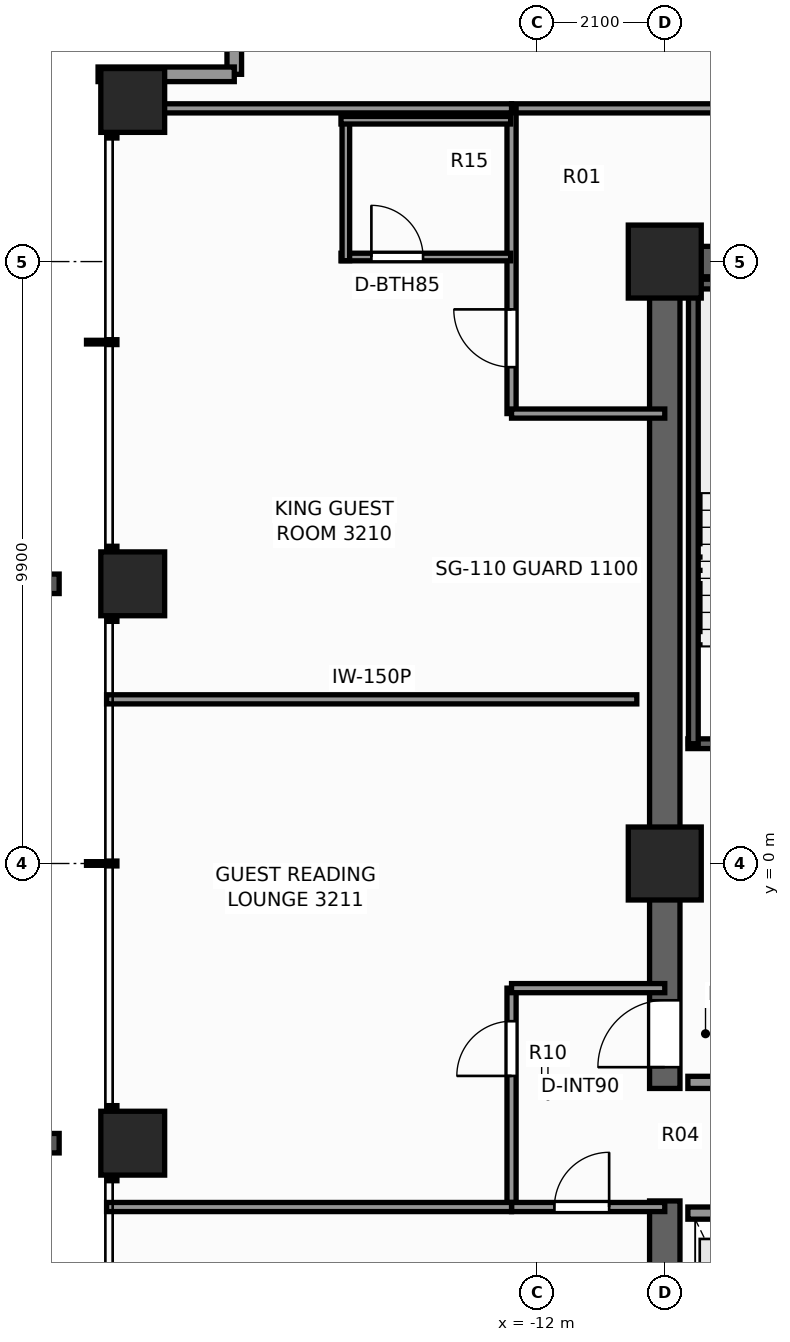
"""IFC4 building model, lengths in metres.
Left out: names, types, materials, properties, quantities, classifications, styles, units other than length and angle.
Written with IfcOpenShell. Run it as: python <this file> out.ifc"""

import sys

from ifc_helpers import new_model, si_unit, direction, frame, frame_2d, origin, origin_2d, place, context, subcontext, project, spatial, rectangle, extrude, element, fill, save


model = new_model("IFC4")
c1 = context("Model", 3, precision=1e-05, world=origin(), true_north=direction((0.0, 1.0)))
c2 = subcontext(c1, "Body", "Model", "MODEL_VIEW")
j1 = project(units=[si_unit("LENGTHUNIT", "METRE"), si_unit("PLANEANGLEUNIT", "RADIAN")], contexts=[c1])
p1 = place(None, origin())
s1 = spatial("IfcSite", under=j1, at=p1, CompositionType="ELEMENT")
p2 = place(p1, origin())
s2 = spatial("IfcBuilding", under=s1, at=p2, CompositionType="ELEMENT")
p3 = place(p2, frame((0.0, 0.0, 111.8)))
s3 = spatial("IfcBuildingStorey", under=s2, at=p3, CompositionType="ELEMENT", Elevation=111.8)
p4 = place(p3, frame((-10.15, 9.9, 0.0), z_axis=(0.0, 0.0, 1.0), x_axis=(1.0, 0.0, 0.0)))
e1 = element("IfcWall", 1, at=p4, inside=s3, PredefinedType="SHEAR", context=c2, shape_type="SweptSolid", body=[
    extrude(rectangle(XDim=14.57, YDim=0.5, at=frame_2d((7.285, 0.0))), origin(), (0.0, 0.0, 1.0), 3.3),
])
p5 = place(p3, frame((-9.9, -9.65, 0.0), z_axis=(0.0, 0.0, 1.0), x_axis=(0.0, 1.0, 0.0)))
e2 = element("IfcWall", 2, at=p5, inside=s3, PredefinedType="SHEAR", context=c2, shape_type="SweptSolid", body=[
    extrude(rectangle(XDim=4.1, YDim=0.5, at=frame_2d((2.05, 0.0))), origin(), (0.0, 0.0, 1.0), 3.3),
])
p6 = place(p3, frame((-9.9, -3.7, 0.0), z_axis=(0.0, 0.0, 1.0), x_axis=(0.0, 1.0, 0.0)))
e3 = element("IfcWall", 3, at=p6, inside=s3, PredefinedType="SHEAR", context=c2, shape_type="SweptSolid", body=[
    extrude(rectangle(XDim=13.35, YDim=0.5, at=frame_2d((6.675, 0.0))), origin(), (0.0, 0.0, 1.0), 3.3),
])
p7 = place(p6, frame((0.35, 0.0, 0.0)))
e4 = element("IfcOpeningElement", 4, at=p7, cuts=e3, PredefinedType="OPENING", context=c2, shape_type="SweptSolid", body=[
    extrude(rectangle(XDim=1.1, YDim=2.2, at=frame_2d((0.55, 1.1))), frame((0.0, 0.26, 0.0), z_axis=(0.0, -1.0, 0.0), x_axis=(1.0, 0.0, 0.0)), (0.0, 0.0, 1.0), 0.52),
])
for number, where, z_axis, x_axis in (
    (5, (-9.9, 9.9, 0.0), (0.0, 0.0, 1.0), (1.0, 0.0, 0.0)),
    (6, (-9.9, 0.0, 0.0), (0.0, 0.0, 1.0), (1.0, 0.0, 0.0)),
):
    element("IfcColumn", number, at=place(p3, frame(where, z_axis=z_axis, x_axis=x_axis)), inside=s3, PredefinedType="COLUMN", context=c2, shape_type="SweptSolid", body=[
        extrude(rectangle(XDim=1.2, YDim=1.2, at=origin_2d()), origin(), (0.0, 0.0, 1.0), 3.3),
    ])
for number, where, z_axis, x_axis in (
    (7, (-18.65, -4.6, 0.0), (0.0, 0.0, 1.0), (1.0, 0.0, 0.0)),
    (8, (-18.65, 4.6, 0.0), (0.0, 0.0, 1.0), (1.0, 0.0, 0.0)),
    (9, (-18.65, 12.55, 0.0), (0.0, 0.0, 1.0), (1.0, 0.0, 0.0)),
):
    element("IfcColumn", number, at=place(p3, frame(where, z_axis=z_axis, x_axis=x_axis)), inside=s3, PredefinedType="COLUMN", context=c2, shape_type="SweptSolid", body=[
        extrude(rectangle(XDim=1.05, YDim=1.05, at=origin_2d()), origin(), (0.0, 0.0, 1.0), 3.3),
    ])
p8 = place(p3, frame((-16.98, 12.98, 0.0), z_axis=(0.0, 0.0, 1.0), x_axis=(0.0, 1.0, 0.0)))
e10 = element("IfcWall", 10, at=p8, inside=s3, PredefinedType="STANDARD", context=c2, shape_type="SweptSolid", body=[
    extrude(rectangle(XDim=2.24, YDim=0.24, at=frame_2d((1.12, 0.0))), origin(), (0.0, 0.0, 1.0), 2.459),
])
p9 = place(p8, frame((0.45, 0.0, 0.65)))
e11 = element("IfcOpeningElement", 11, at=p9, cuts=e10, PredefinedType="OPENING", context=c2, shape_type="SweptSolid", body=[
    extrude(rectangle(XDim=1.1, YDim=1.45, at=frame_2d((0.55, 0.725))), frame((0.0, 0.13, 0.0), z_axis=(0.0, -1.0, 0.0), x_axis=(1.0, 0.0, 0.0)), (0.0, 0.0, 1.0), 0.26),
])
p10 = place(p3, frame((-19.22, 12.98, 0.0), z_axis=(0.0, 0.0, 1.0), x_axis=(1.0, 0.0, 0.0)))
e12 = element("IfcWall", 12, at=p10, inside=s3, PredefinedType="STANDARD", context=c2, shape_type="SweptSolid", body=[
    extrude(rectangle(XDim=2.24, YDim=0.24, at=frame_2d((1.12, 0.0))), origin(), (0.0, 0.0, 1.0), 2.459),
])
p11 = place(p3, frame((-9.52, 1.97, 0.0), z_axis=(0.0, 0.0, 1.0), x_axis=(1.0, 0.0, 0.0)))
e13 = element("IfcWall", 13, at=p11, inside=s3, PredefinedType="SHEAR", context=c2, shape_type="SweptSolid", body=[
    extrude(rectangle(XDim=3.52, YDim=0.16, at=frame_2d((1.76, 0.0))), origin(), (0.0, 0.0, 1.0), 3.3),
])
p12 = place(p11, frame((1.15, 0.0, 0.0)))
e14 = element("IfcOpeningElement", 14, at=p12, cuts=e13, PredefinedType="OPENING", context=c2, shape_type="SweptSolid", body=[
    extrude(rectangle(XDim=1.1, YDim=2.2, at=frame_2d((0.55, 1.1))), frame((0.0, 0.09, 0.0), z_axis=(0.0, -1.0, 0.0), x_axis=(1.0, 0.0, 0.0)), (0.0, 0.0, 1.0), 0.18),
])
p13 = place(p3, frame((-9.52, 9.53, 0.0), z_axis=(0.0, 0.0, 1.0), x_axis=(1.0, 0.0, 0.0)))
e15 = element("IfcWall", 15, at=p13, inside=s3, PredefinedType="SHEAR", context=c2, shape_type="SweptSolid", body=[
    extrude(rectangle(XDim=3.52, YDim=0.16, at=frame_2d((1.76, 0.0))), origin(), (0.0, 0.0, 1.0), 3.3),
])
p14 = place(p3, frame((-9.43, 1.97, 0.0), z_axis=(0.0, 0.0, 1.0), x_axis=(0.0, 1.0, 0.0)))
e16 = element("IfcWall", 16, at=p14, inside=s3, PredefinedType="SHEAR", context=c2, shape_type="SweptSolid", body=[
    extrude(rectangle(XDim=7.56, YDim=0.16, at=frame_2d((3.78, 0.0))), origin(), (0.0, 0.0, 1.0), 3.3),
])
p15 = place(p3, frame((-9.52, -3.6, 0.0), z_axis=(0.0, 0.0, 1.0), x_axis=(1.0, 0.0, 0.0)))
e17 = element("IfcWall", 17, at=p15, inside=s3, PredefinedType="SOLIDWALL", context=c2, shape_type="SweptSolid", body=[
    extrude(rectangle(XDim=3.77, YDim=0.2, at=frame_2d((1.885, 0.0))), origin(), (0.0, 0.0, 1.0), 3.08),
])
p16 = place(p15, frame((1.15, 0.0, 0.0)))
e18 = element("IfcOpeningElement", 18, at=p16, cuts=e17, PredefinedType="OPENING", context=c2, shape_type="SweptSolid", body=[
    extrude(rectangle(XDim=0.95, YDim=2.06, at=frame_2d((0.475, 1.03))), frame((0.0, 0.11, 0.0), z_axis=(0.0, -1.0, 0.0), x_axis=(1.0, 0.0, 0.0)), (0.0, 0.0, 1.0), 0.22),
])
p17 = place(p3, frame((-9.52, -5.75, 0.0), z_axis=(0.0, 0.0, 1.0), x_axis=(1.0, 0.0, 0.0)))
e19 = element("IfcWall", 19, at=p17, inside=s3, PredefinedType="SOLIDWALL", context=c2, shape_type="SweptSolid", body=[
    extrude(rectangle(XDim=5.66, YDim=0.2, at=frame_2d((2.83, 0.0))), origin(), (0.0, 0.0, 1.0), 3.08),
])
p18 = place(p17, frame((0.55, 0.0, 0.0)))
e20 = element("IfcOpeningElement", 20, at=p18, cuts=e19, PredefinedType="OPENING", context=c2, shape_type="SweptSolid", body=[
    extrude(rectangle(XDim=1.1, YDim=2.2, at=frame_2d((0.55, 1.1))), frame((0.0, 0.11, 0.0), z_axis=(0.0, -1.0, 0.0), x_axis=(1.0, 0.0, 0.0)), (0.0, 0.0, 1.0), 0.22),
])
p19 = place(p17, frame((2.48, 0.0, 0.0)))
e21 = element("IfcOpeningElement", 21, at=p19, cuts=e19, PredefinedType="OPENING", context=c2, shape_type="SweptSolid", body=[
    extrude(rectangle(XDim=1.1, YDim=2.2, at=frame_2d((0.55, 1.1))), frame((0.0, 0.11, 0.0), z_axis=(0.0, -1.0, 0.0), x_axis=(1.0, 0.0, 0.0)), (0.0, 0.0, 1.0), 0.22),
])
p20 = place(p17, frame((4.41, 0.0, 0.0)))
e22 = element("IfcOpeningElement", 22, at=p20, cuts=e19, PredefinedType="OPENING", context=c2, shape_type="SweptSolid", body=[
    extrude(rectangle(XDim=1.1, YDim=2.2, at=frame_2d((0.55, 1.1))), frame((0.0, 0.11, 0.0), z_axis=(0.0, -1.0, 0.0), x_axis=(1.0, 0.0, 0.0)), (0.0, 0.0, 1.0), 0.22),
])
p21 = place(p3, frame((-12.42, 12.42, 0.0), z_axis=(0.0, 0.0, 1.0), x_axis=(1.0, 0.0, 0.0)))
e23 = element("IfcWall", 23, at=p21, inside=s3, PredefinedType="PARTITIONING", context=c2, shape_type="SweptSolid", body=[
    extrude(rectangle(XDim=24.68, YDim=0.15, at=frame_2d((12.34, 0.0))), origin(), (0.0, 0.0, 1.0), 2.292),
])
p22 = place(p21, frame((3.781, 0.0, 0.0)))
e24 = element("IfcOpeningElement", 24, at=p22, cuts=e23, PredefinedType="OPENING", context=c2, shape_type="SweptSolid", body=[
    extrude(rectangle(XDim=0.9, YDim=2.06, at=frame_2d((0.45, 1.03))), frame((0.0, 0.085, 0.0), z_axis=(0.0, -1.0, 0.0), x_axis=(1.0, 0.0, 0.0)), (0.0, 0.0, 1.0), 0.17),
])
p23 = place(p21, frame((8.773, 0.0, 0.0)))
e25 = element("IfcOpeningElement", 25, at=p23, cuts=e23, PredefinedType="OPENING", context=c2, shape_type="SweptSolid", body=[
    extrude(rectangle(XDim=0.9, YDim=2.06, at=frame_2d((0.45, 1.03))), frame((0.0, 0.085, 0.0), z_axis=(0.0, -1.0, 0.0), x_axis=(1.0, 0.0, 0.0)), (0.0, 0.0, 1.0), 0.17),
])
p24 = place(p21, frame((10.656, 0.0, 0.0)))
e26 = element("IfcOpeningElement", 26, at=p24, cuts=e23, PredefinedType="OPENING", context=c2, shape_type="SweptSolid", body=[
    extrude(rectangle(XDim=0.9, YDim=2.06, at=frame_2d((0.45, 1.03))), frame((0.0, 0.085, 0.0), z_axis=(0.0, -1.0, 0.0), x_axis=(1.0, 0.0, 0.0)), (0.0, 0.0, 1.0), 0.17),
])
p25 = place(p21, frame((13.773, 0.0, 0.0)))
e27 = element("IfcOpeningElement", 27, at=p25, cuts=e23, PredefinedType="OPENING", context=c2, shape_type="SweptSolid", body=[
    extrude(rectangle(XDim=0.95, YDim=2.06, at=frame_2d((0.475, 1.03))), frame((0.0, 0.085, 0.0), z_axis=(0.0, -1.0, 0.0), x_axis=(1.0, 0.0, 0.0)), (0.0, 0.0, 1.0), 0.17),
])
p26 = place(p21, frame((18.0, 0.0, 0.0)))
e28 = element("IfcOpeningElement", 28, at=p26, cuts=e23, PredefinedType="OPENING", context=c2, shape_type="SweptSolid", body=[
    extrude(rectangle(XDim=0.9, YDim=2.06, at=frame_2d((0.45, 1.03))), frame((0.0, 0.085, 0.0), z_axis=(0.0, -1.0, 0.0), x_axis=(1.0, 0.0, 0.0)), (0.0, 0.0, 1.0), 0.17),
])
p27 = place(p21, frame((19.861, 0.0, 0.0)))
e29 = element("IfcOpeningElement", 29, at=p27, cuts=e23, PredefinedType="OPENING", context=c2, shape_type="SweptSolid", body=[
    extrude(rectangle(XDim=0.95, YDim=2.06, at=frame_2d((0.475, 1.03))), frame((0.0, 0.085, 0.0), z_axis=(0.0, -1.0, 0.0), x_axis=(1.0, 0.0, 0.0)), (0.0, 0.0, 1.0), 0.17),
])
p28 = place(p3, frame((-12.42, 7.4, 0.0), z_axis=(0.0, 0.0, 1.0), x_axis=(0.0, 1.0, 0.0)))
e30 = element("IfcWall", 30, at=p28, inside=s3, PredefinedType="PARTITIONING", context=c2, shape_type="SweptSolid", body=[
    extrude(rectangle(XDim=5.02, YDim=0.15, at=frame_2d((2.51, 0.0))), origin(), (0.0, 0.0, 1.0), 2.292),
])
p29 = place(p28, frame((0.764, 0.0, 0.0)))
e31 = element("IfcOpeningElement", 31, at=p29, cuts=e30, PredefinedType="OPENING", context=c2, shape_type="SweptSolid", body=[
    extrude(rectangle(XDim=0.95, YDim=2.06, at=frame_2d((0.475, 1.03))), frame((0.0, 0.085, 0.0), z_axis=(0.0, -1.0, 0.0), x_axis=(1.0, 0.0, 0.0)), (0.0, 0.0, 1.0), 0.17),
])
p30 = place(p3, frame((-12.42, 7.4, 0.0), z_axis=(0.0, 0.0, 1.0), x_axis=(1.0, 0.0, 0.0)))
e32 = element("IfcWall", 32, at=p30, inside=s3, PredefinedType="PARTITIONING", context=c2, shape_type="SweptSolid", body=[
    extrude(rectangle(XDim=2.52, YDim=0.15, at=frame_2d((1.26, 0.0))), origin(), (0.0, 0.0, 1.0), 3.08),
])
p31 = place(p3, frame((-12.42, -5.65, 0.0), z_axis=(0.0, 0.0, 1.0), x_axis=(0.0, 1.0, 0.0)))
e33 = element("IfcWall", 33, at=p31, inside=s3, PredefinedType="PARTITIONING", context=c2, shape_type="SweptSolid", body=[
    extrude(rectangle(XDim=3.6, YDim=0.15, at=frame_2d((1.8, 0.0))), origin(), (0.0, 0.0, 1.0), 2.292),
])
p32 = place(p31, frame((2.156, 0.0, 0.0)))
e34 = element("IfcOpeningElement", 34, at=p32, cuts=e33, PredefinedType="OPENING", context=c2, shape_type="SweptSolid", body=[
    extrude(rectangle(XDim=0.9, YDim=2.06, at=frame_2d((0.45, 1.03))), frame((0.0, 0.085, 0.0), z_axis=(0.0, -1.0, 0.0), x_axis=(1.0, 0.0, 0.0)), (0.0, 0.0, 1.0), 0.17),
])
p33 = place(p3, frame((-12.42, -2.05, 0.0), z_axis=(0.0, 0.0, 1.0), x_axis=(1.0, 0.0, 0.0)))
e35 = element("IfcWall", 35, at=p33, inside=s3, PredefinedType="PARTITIONING", context=c2, shape_type="SweptSolid", body=[
    extrude(rectangle(XDim=2.52, YDim=0.15, at=frame_2d((1.26, 0.0))), origin(), (0.0, 0.0, 1.0), 3.08),
])
p34 = place(p3, frame((-12.42, -5.65, 0.0), z_axis=(0.0, 0.0, 1.0), x_axis=(1.0, 0.0, 0.0)))
e36 = element("IfcWall", 36, at=p34, inside=s3, PredefinedType="PARTITIONING", context=c2, shape_type="SweptSolid", body=[
    extrude(rectangle(XDim=2.52, YDim=0.15, at=frame_2d((1.26, 0.0))), origin(), (0.0, 0.0, 1.0), 3.08),
])
p35 = place(p34, frame((0.705, 0.0, 0.0)))
e37 = element("IfcOpeningElement", 37, at=p35, cuts=e36, PredefinedType="OPENING", context=c2, shape_type="SweptSolid", body=[
    extrude(rectangle(XDim=0.9, YDim=2.06, at=frame_2d((0.45, 1.03))), frame((0.0, 0.085, 0.0), z_axis=(0.0, -1.0, 0.0), x_axis=(1.0, 0.0, 0.0)), (0.0, 0.0, 1.0), 0.17),
])
p36 = place(p3, frame((-19.08, 12.42, 0.0), z_axis=(0.0, 0.0, 1.0), x_axis=(1.0, 0.0, 0.0)))
e38 = element("IfcWall", 38, at=p36, inside=s3, PredefinedType="PARTITIONING", context=c2, shape_type="SweptSolid", body=[
    extrude(rectangle(XDim=6.66, YDim=0.15, at=frame_2d((3.33, 0.0))), origin(), (0.0, 0.0, 1.0), 2.292),
])
p37 = place(p3, frame((-19.08, 2.7, 0.0), z_axis=(0.0, 0.0, 1.0), x_axis=(1.0, 0.0, 0.0)))
e39 = element("IfcWall", 39, at=p37, inside=s3, PredefinedType="PARTITIONING", context=c2, shape_type="SweptSolid", body=[
    extrude(rectangle(XDim=8.72, YDim=0.15, at=frame_2d((4.36, 0.0))), origin(), (0.0, 0.0, 1.0), 2.449),
])
p38 = place(p3, frame((-19.08, -5.65, 0.0), z_axis=(0.0, 0.0, 1.0), x_axis=(1.0, 0.0, 0.0)))
e40 = element("IfcWall", 40, at=p38, inside=s3, PredefinedType="PARTITIONING", context=c2, shape_type="SweptSolid", body=[
    extrude(rectangle(XDim=6.66, YDim=0.15, at=frame_2d((3.33, 0.0))), origin(), (0.0, 0.0, 1.0), 2.449),
])
p39 = place(p3, frame((-15.225, 9.975, 0.0), z_axis=(0.0, 0.0, 1.0), x_axis=(1.0, 0.0, 0.0)))
e41 = element("IfcWall", 41, at=p39, inside=s3, PredefinedType="PARTITIONING", context=c2, shape_type="SweptSolid", body=[
    extrude(rectangle(XDim=2.79, YDim=0.125, at=frame_2d((1.395, 0.0))), origin(), (0.0, 0.0, 1.0), 3.08),
])
p40 = place(p39, frame((0.5, 0.0, 0.0)))
e42 = element("IfcOpeningElement", 42, at=p40, cuts=e41, PredefinedType="OPENING", context=c2, shape_type="SweptSolid", body=[
    extrude(rectangle(XDim=0.85, YDim=2.03, at=frame_2d((0.425, 1.015))), frame((0.0, 0.073, 0.0), z_axis=(0.0, -1.0, 0.0), x_axis=(1.0, 0.0, 0.0)), (0.0, 0.0, 1.0), 0.145),
])
p41 = place(p3, frame((-15.145, 9.915, 0.0), z_axis=(0.0, 0.0, 1.0), x_axis=(0.0, 1.0, 0.0)))
e43 = element("IfcWall", 43, at=p41, inside=s3, PredefinedType="PARTITIONING", context=c2, shape_type="SweptSolid", body=[
    extrude(rectangle(XDim=2.37, YDim=0.125, at=frame_2d((1.185, 0.0))), origin(), (0.0, 0.0, 1.0), 2.292),
])
p42 = place(p3, frame((-15.225, 12.225, 0.0), z_axis=(0.0, 0.0, 1.0), x_axis=(1.0, 0.0, 0.0)))
e44 = element("IfcWall", 44, at=p42, inside=s3, PredefinedType="PARTITIONING", context=c2, shape_type="SweptSolid", body=[
    extrude(rectangle(XDim=2.79, YDim=0.125, at=frame_2d((1.395, 0.0))), origin(), (0.0, 0.0, 1.0), 3.08),
])
p43 = place(p7, origin())
e45 = element("IfcDoor", 45, at=p43, inside=s3, OperationType="SINGLE_SWING_LEFT", PredefinedType="DOOR", context=c2, shape_type="SweptSolid", body=[
    extrude(rectangle(XDim=1.1, YDim=2.2, at=frame_2d((0.55, 1.1))), frame((0.0, 0.025, 0.0), z_axis=(0.0, -1.0, 0.0), x_axis=(1.0, 0.0, 0.0)), (0.0, 0.0, 1.0), 0.05),
])
fill(e4, e45)
p44 = place(p40, origin())
e46 = element("IfcDoor", 46, at=p44, inside=s3, OperationType="SINGLE_SWING_LEFT", PredefinedType="DOOR", context=c2, shape_type="SweptSolid", body=[
    extrude(rectangle(XDim=0.85, YDim=2.03, at=frame_2d((0.425, 1.015))), frame((0.0, 0.025, 0.0), z_axis=(0.0, -1.0, 0.0), x_axis=(1.0, 0.0, 0.0)), (0.0, 0.0, 1.0), 0.05),
])
fill(e42, e46)
p45 = place(p29, origin())
e47 = element("IfcDoor", 47, at=p45, inside=s3, OperationType="SINGLE_SWING_RIGHT", PredefinedType="DOOR", context=c2, shape_type="SweptSolid", body=[
    extrude(rectangle(XDim=0.95, YDim=2.06, at=frame_2d((0.475, 1.03))), frame((0.0, 0.025, 0.0), z_axis=(0.0, -1.0, 0.0), x_axis=(1.0, 0.0, 0.0)), (0.0, 0.0, 1.0), 0.05),
])
fill(e31, e47)
p46 = place(p32, origin())
e48 = element("IfcDoor", 48, at=p46, inside=s3, OperationType="SINGLE_SWING_LEFT", PredefinedType="DOOR", context=c2, shape_type="SweptSolid", body=[
    extrude(rectangle(XDim=0.9, YDim=2.06, at=frame_2d((0.45, 1.03))), frame((0.0, 0.025, 0.0), z_axis=(0.0, -1.0, 0.0), x_axis=(1.0, 0.0, 0.0)), (0.0, 0.0, 1.0), 0.05),
])
fill(e34, e48)
p47 = place(p35, origin())
e49 = element("IfcDoor", 49, at=p47, inside=s3, OperationType="SINGLE_SWING_RIGHT", PredefinedType="DOOR", context=c2, shape_type="SweptSolid", body=[
    extrude(rectangle(XDim=0.9, YDim=2.06, at=frame_2d((0.45, 1.03))), frame((0.0, 0.025, 0.0), z_axis=(0.0, -1.0, 0.0), x_axis=(1.0, 0.0, 0.0)), (0.0, 0.0, 1.0), 0.05),
])
fill(e37, e49)
save(model, sys.argv[1])
